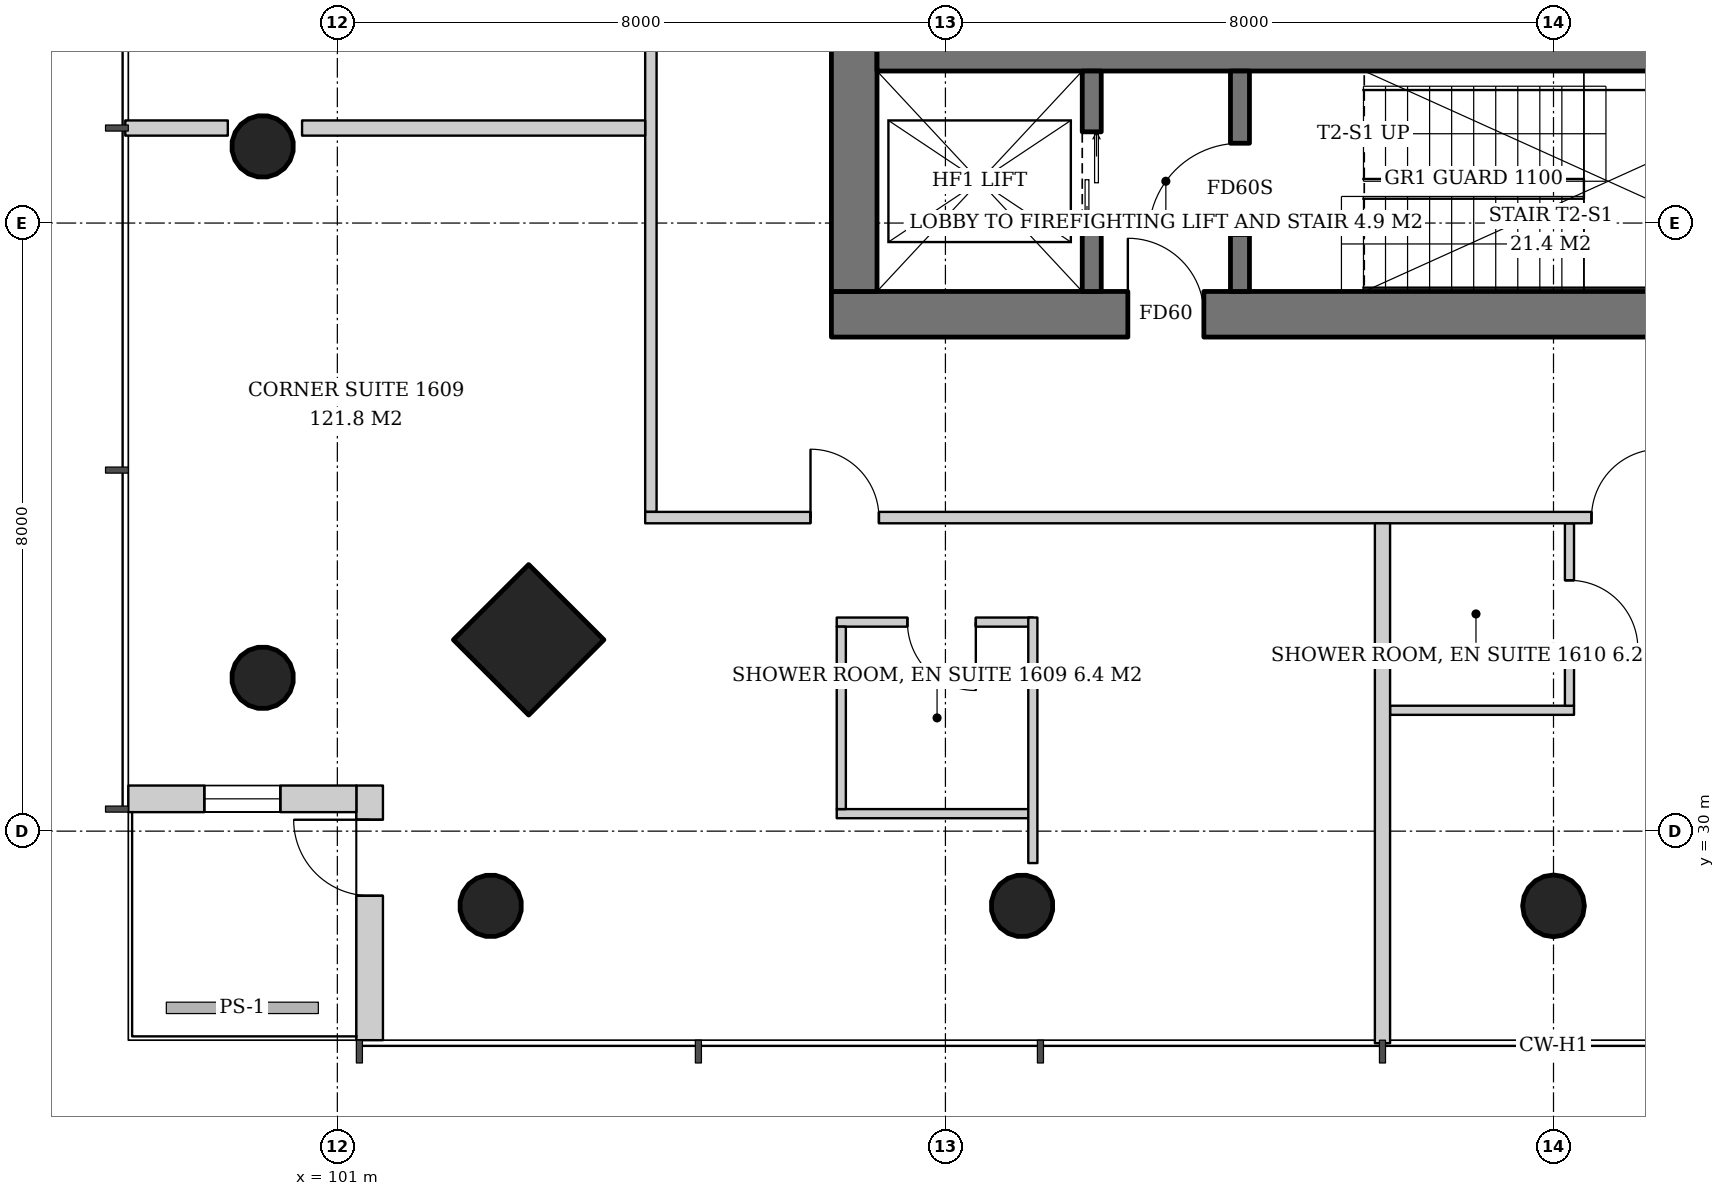
"""IFC4 building model, lengths in metres.
Left out: names, types, materials, properties, quantities, classifications, styles, units other than length and angle.
Written with IfcOpenShell. Run it as: python <this file> out.ifc"""

import sys

from ifc_helpers import new_model, si_unit, direction, frame, frame_2d, origin, origin_2d, place, context, subcontext, project, spatial, rectangle, hollow_circle, extrude, element, fill, save


model = new_model("IFC4")
c1 = context("Model", 3, precision=1e-05, world=origin(), true_north=direction((0.0, 1.0)))
c2 = subcontext(c1, "Body", "Model", "MODEL_VIEW")
j1 = project(units=[si_unit("LENGTHUNIT", "METRE"), si_unit("PLANEANGLEUNIT", "RADIAN")], contexts=[c1])
p1 = place(None, origin())
s1 = spatial("IfcSite", under=j1, at=p1, CompositionType="ELEMENT")
p2 = place(p1, origin())
s2 = spatial("IfcBuilding", under=s1, at=p2, CompositionType="ELEMENT")
p3 = place(p2, frame((0.0, 0.0, 66.6)))
s3 = spatial("IfcBuildingStorey", under=s2, at=p3, CompositionType="ELEMENT", Elevation=66.6)
p4 = place(p3, frame((103.466, 32.466, 0.0), z_axis=(0.043032401563, 0.043032401563, 0.998146494675), x_axis=(-0.707106781187, 0.707106781187, 0.0)))
e1 = element("IfcColumn", 1, at=p4, inside=s3, PredefinedType="COLUMN", context=c2, shape_type="SweptSolid", body=[
    extrude(rectangle(XDim=1.4, YDim=1.4, at=origin_2d()), origin(), (0.0, 0.0, 1.0), 3.807),
])
p5 = place(p3, frame((99.966, 31.966, 0.0), z_axis=(0.043032401563, 0.043032401563, 0.998146494675), x_axis=(-0.707106781187, 0.707106781187, 0.0)))
e2 = element("IfcColumn", 2, at=p5, inside=s3, PredefinedType="COLUMN", context=c2, shape_type="SweptSolid", body=[
    extrude(hollow_circle(Radius=0.406, WallThickness=0.03, at=origin_2d()), origin(), (0.0, 0.0, 1.0), 3.807),
])
p6 = place(p3, frame((99.966, 38.983, 0.0), z_axis=(0.043062285527, 0.021563230905, 0.998839660125), x_axis=(-0.44774654769, 0.894160516368, 0.0)))
e3 = element("IfcColumn", 3, at=p6, inside=s3, PredefinedType="COLUMN", context=c2, shape_type="SweptSolid", body=[
    extrude(hollow_circle(Radius=0.406, WallThickness=0.03, at=origin_2d()), origin(), (0.0, 0.0, 1.0), 3.804),
])
p7 = place(p3, frame((102.966, 28.966, 0.0), z_axis=(0.043032401563, 0.043032401563, 0.998146494675), x_axis=(-0.707106781187, 0.707106781187, 0.0)))
e4 = element("IfcColumn", 4, at=p7, inside=s3, PredefinedType="COLUMN", context=c2, shape_type="SweptSolid", body=[
    extrude(hollow_circle(Radius=0.406, WallThickness=0.03, at=origin_2d()), origin(), (0.0, 0.0, 1.0), 3.807),
])
p8 = place(p3, frame((109.983, 28.966, 0.0), z_axis=(0.021563230905, 0.043062285527, 0.998839660125), x_axis=(-0.894160516368, 0.44774654769, 0.0)))
e5 = element("IfcColumn", 5, at=p8, inside=s3, PredefinedType="COLUMN", context=c2, shape_type="SweptSolid", body=[
    extrude(hollow_circle(Radius=0.406, WallThickness=0.03, at=origin_2d()), origin(), (0.0, 0.0, 1.0), 3.804),
])
p9 = place(p3, frame((117.0, 28.966, 0.0), z_axis=(0.0, 0.043072300418, 0.999071957837), x_axis=(-1.0, 0.0, 0.0)))
e6 = element("IfcColumn", 6, at=p9, inside=s3, PredefinedType="COLUMN", context=c2, shape_type="SweptSolid", body=[
    extrude(hollow_circle(Radius=0.406, WallThickness=0.03, at=origin_2d()), origin(), (0.0, 0.0, 1.0), 3.803),
])
p10 = place(p3, frame((107.5, 36.8, 0.0), z_axis=(0.0, 0.0, 1.0), x_axis=(1.0, 0.0, 0.0)))
e7 = element("IfcWall", 7, at=p10, inside=s3, PredefinedType="SHEAR", context=c2, shape_type="SweptSolid", body=[
    extrude(rectangle(XDim=19.0, YDim=0.6, at=frame_2d((9.5, 0.0))), origin(), (0.0, 0.0, 1.0), 3.8),
])
p11 = place(p10, frame((3.9, 0.0, 0.0)))
e8 = element("IfcOpeningElement", 8, at=p11, cuts=e7, PredefinedType="OPENING", context=c2, shape_type="SweptSolid", body=[
    extrude(rectangle(XDim=1.0, YDim=2.1, at=frame_2d((0.5, 1.05))), frame((0.0, 0.31, 0.0), z_axis=(0.0, -1.0, 0.0), x_axis=(1.0, 0.0, 0.0)), (0.0, 0.0, 1.0), 0.62),
])
p12 = place(p10, frame((14.472, 0.0, 0.0)))
e9 = element("IfcOpeningElement", 9, at=p12, cuts=e7, PredefinedType="OPENING", context=c2, shape_type="SweptSolid", body=[
    extrude(rectangle(XDim=1.0, YDim=2.1, at=frame_2d((0.5, 1.05))), frame((0.0, 0.31, 0.0), z_axis=(0.0, -1.0, 0.0), x_axis=(1.0, 0.0, 0.0)), (0.0, 0.0, 1.0), 0.62),
])
p13 = place(p10, frame((16.365, 0.0, 0.0)))
e10 = element("IfcOpeningElement", 10, at=p13, cuts=e7, PredefinedType="OPENING", context=c2, shape_type="SweptSolid", body=[
    extrude(rectangle(XDim=1.0, YDim=2.1, at=frame_2d((0.5, 1.05))), frame((0.0, 0.31, 0.0), z_axis=(0.0, -1.0, 0.0), x_axis=(1.0, 0.0, 0.0)), (0.0, 0.0, 1.0), 0.62),
])
p14 = place(p3, frame((107.8, 37.1, 0.0), z_axis=(0.0, 0.0, 1.0), x_axis=(0.0, 1.0, 0.0)))
e11 = element("IfcWall", 11, at=p14, inside=s3, PredefinedType="SHEAR", context=c2, shape_type="SweptSolid", body=[
    extrude(rectangle(XDim=17.8, YDim=0.6, at=frame_2d((8.9, 0.0))), origin(), (0.0, 0.0, 1.0), 3.8),
])
p15 = place(p14, frame((8.0, 0.0, 0.0)))
e12 = element("IfcOpeningElement", 12, at=p15, cuts=e11, PredefinedType="OPENING", context=c2, shape_type="SweptSolid", body=[
    extrude(rectangle(XDim=1.8, YDim=2.4, at=frame_2d((0.9, 1.2))), frame((0.0, 0.31, 0.0), z_axis=(0.0, -1.0, 0.0), x_axis=(1.0, 0.0, 0.0)), (0.0, 0.0, 1.0), 0.62),
])
p16 = place(p3, frame((108.1, 40.2, 0.0), z_axis=(0.0, 0.0, 1.0), x_axis=(1.0, 0.0, 0.0)))
e13 = element("IfcWall", 13, at=p16, inside=s3, PredefinedType="SHEAR", context=c2, shape_type="SweptSolid", body=[
    extrude(rectangle(XDim=17.8, YDim=0.4, at=frame_2d((8.9, 0.0))), origin(), (0.0, 0.0, 1.0), 3.8),
])
p17 = place(p3, frame((101.425, 27.25, 0.0), z_axis=(0.0, 0.0, 1.0), x_axis=(0.0, 1.0, 0.0)))
e14 = element("IfcWall", 14, at=p17, inside=s3, PredefinedType="SOLIDWALL", context=c2, shape_type="SweptSolid", body=[
    extrude(rectangle(XDim=3.35, YDim=0.35, at=frame_2d((1.675, 0.0))), origin(), (0.0, 0.0, 1.0), 3.6),
])
p18 = place(p17, frame((1.9, 0.0, 0.0)))
e15 = element("IfcOpeningElement", 15, at=p18, cuts=e14, PredefinedType="OPENING", context=c2, shape_type="SweptSolid", body=[
    extrude(rectangle(XDim=1.0, YDim=2.4, at=frame_2d((0.5, 1.2))), frame((0.0, 0.185, 0.0), z_axis=(0.0, -1.0, 0.0), x_axis=(1.0, 0.0, 0.0)), (0.0, 0.0, 1.0), 0.37),
])
p19 = place(p3, frame((101.25, 30.425, 0.0), z_axis=(0.0, 0.0, 1.0), x_axis=(-1.0, 0.0, 0.0)))
e16 = element("IfcWall", 16, at=p19, inside=s3, PredefinedType="SOLIDWALL", context=c2, shape_type="SweptSolid", body=[
    extrude(rectangle(XDim=3.0, YDim=0.35, at=frame_2d((1.5, 0.0))), origin(), (0.0, 0.0, 1.0), 3.6),
])
p20 = place(p19, frame((1.0, 0.0, 0.9)))
e17 = element("IfcOpeningElement", 17, at=p20, cuts=e16, PredefinedType="OPENING", context=c2, shape_type="SweptSolid", body=[
    extrude(rectangle(XDim=1.0, YDim=2.4, at=frame_2d((0.5, 1.2))), frame((0.0, 0.185, 0.0), z_axis=(0.0, -1.0, 0.0), x_axis=(1.0, 0.0, 0.0)), (0.0, 0.0, 1.0), 0.37),
])
p21 = place(p3, frame((110.925, 37.1, 0.0), z_axis=(0.0, 0.0, 1.0), x_axis=(0.0, 1.0, 0.0)))
e18 = element("IfcWall", 18, at=p21, inside=s3, PredefinedType="SHEAR", context=c2, shape_type="SweptSolid", body=[
    extrude(rectangle(XDim=2.9, YDim=0.25, at=frame_2d((1.45, 0.0))), origin(), (0.0, 0.0, 1.0), 3.8),
])
p22 = place(p21, frame((0.8, 0.0, 0.0)))
e19 = element("IfcOpeningElement", 19, at=p22, cuts=e18, PredefinedType="OPENING", context=c2, shape_type="SweptSolid", body=[
    extrude(rectangle(XDim=1.3, YDim=2.2, at=frame_2d((0.65, 1.1))), frame((0.0, 0.135, 0.0), z_axis=(0.0, -1.0, 0.0), x_axis=(1.0, 0.0, 0.0)), (0.0, 0.0, 1.0), 0.27),
])
p23 = place(p3, frame((112.875, 37.1, 0.0), z_axis=(0.0, 0.0, 1.0), x_axis=(0.0, 1.0, 0.0)))
e20 = element("IfcWall", 20, at=p23, inside=s3, PredefinedType="SHEAR", context=c2, shape_type="SweptSolid", body=[
    extrude(rectangle(XDim=2.9, YDim=0.25, at=frame_2d((1.45, 0.0))), origin(), (0.0, 0.0, 1.0), 3.8),
])
p24 = place(p23, frame((0.75, 0.0, 0.0)))
e21 = element("IfcOpeningElement", 21, at=p24, cuts=e20, PredefinedType="OPENING", context=c2, shape_type="SweptSolid", body=[
    extrude(rectangle(XDim=1.2, YDim=2.1, at=frame_2d((0.6, 1.05))), frame((0.0, 0.135, 0.0), z_axis=(0.0, -1.0, 0.0), x_axis=(1.0, 0.0, 0.0)), (0.0, 0.0, 1.0), 0.27),
])
p25 = place(p3, frame((105.125, 57.95, 0.0), z_axis=(0.0, 0.0, 1.0), x_axis=(0.0, -1.0, 0.0)))
e22 = element("IfcWall", 22, at=p25, inside=s3, PredefinedType="PARTITIONING", context=c2, shape_type="SweptSolid", body=[
    extrude(rectangle(XDim=23.75, YDim=0.15, at=frame_2d((11.875, 0.0))), origin(), (0.0, 0.0, 1.0), 2.8),
])
p26 = place(p25, frame((2.175, 0.0, 0.0)))
e23 = element("IfcOpeningElement", 23, at=p26, cuts=e22, PredefinedType="OPENING", context=c2, shape_type="SweptSolid", body=[
    extrude(rectangle(XDim=0.9, YDim=2.1, at=frame_2d((0.45, 1.05))), frame((0.0, 0.085, 0.0), z_axis=(0.0, -1.0, 0.0), x_axis=(1.0, 0.0, 0.0)), (0.0, 0.0, 1.0), 0.17),
])
p27 = place(p25, frame((7.9, 0.0, 0.0)))
e24 = element("IfcOpeningElement", 24, at=p27, cuts=e22, PredefinedType="OPENING", context=c2, shape_type="SweptSolid", body=[
    extrude(rectangle(XDim=1.0, YDim=2.1, at=frame_2d((0.5, 1.05))), frame((0.0, 0.085, 0.0), z_axis=(0.0, -1.0, 0.0), x_axis=(1.0, 0.0, 0.0)), (0.0, 0.0, 1.0), 0.17),
])
p28 = place(p25, frame((12.45, 0.0, 0.0)))
e25 = element("IfcOpeningElement", 25, at=p28, cuts=e22, PredefinedType="OPENING", context=c2, shape_type="SweptSolid", body=[
    extrude(rectangle(XDim=0.9, YDim=2.1, at=frame_2d((0.45, 1.05))), frame((0.0, 0.085, 0.0), z_axis=(0.0, -1.0, 0.0), x_axis=(1.0, 0.0, 0.0)), (0.0, 0.0, 1.0), 0.17),
])
p29 = place(p3, frame((105.05, 39.25, 0.0), z_axis=(0.0, 0.0, 1.0), x_axis=(-1.0, 0.0, 0.0)))
e26 = element("IfcWall", 26, at=p29, inside=s3, PredefinedType="PARTITIONING", context=c2, shape_type="SweptSolid", body=[
    extrude(rectangle(XDim=4.514, YDim=0.2, at=frame_2d((2.257, 0.0))), origin(), (0.0, 0.0, 1.0), 3.6),
])
p30 = place(p3, frame((99.559, 39.25, 0.0), z_axis=(0.0, 0.0, 1.0), x_axis=(-1.0, 0.0, 0.0)))
e27 = element("IfcWall", 27, at=p30, inside=s3, PredefinedType="PARTITIONING", context=c2, shape_type="SweptSolid", body=[
    extrude(rectangle(XDim=1.349, YDim=0.2, at=frame_2d((0.675, 0.0))), origin(), (0.0, 0.0, 1.0), 3.6),
])
p31 = place(p3, frame((110.15, 32.75, 0.0), z_axis=(0.0, 0.0, 1.0), x_axis=(-1.0, 0.0, 0.0)))
e28 = element("IfcWall", 28, at=p31, inside=s3, PredefinedType="PARTITIONING", context=c2, shape_type="SweptSolid", body=[
    extrude(rectangle(XDim=2.58, YDim=0.12, at=frame_2d((1.29, 0.0))), origin(), (0.0, 0.0, 1.0), 2.8),
])
p32 = place(p31, frame((0.75, 0.0, 0.0)))
e29 = element("IfcOpeningElement", 29, at=p32, cuts=e28, PredefinedType="OPENING", context=c2, shape_type="SweptSolid", body=[
    extrude(rectangle(XDim=0.9, YDim=2.1, at=frame_2d((0.45, 1.05))), frame((0.0, 0.07, 0.0), z_axis=(0.0, -1.0, 0.0), x_axis=(1.0, 0.0, 0.0)), (0.0, 0.0, 1.0), 0.14),
])
p33 = place(p3, frame((110.15, 30.23, 0.0), z_axis=(0.0, 0.0, 1.0), x_axis=(-1.0, 0.0, 0.0)))
e30 = element("IfcWall", 30, at=p33, inside=s3, PredefinedType="PARTITIONING", context=c2, shape_type="SweptSolid", body=[
    extrude(rectangle(XDim=2.58, YDim=0.12, at=frame_2d((1.29, 0.0))), origin(), (0.0, 0.0, 1.0), 2.8),
])
p34 = place(p3, frame((107.63, 32.69, 0.0), z_axis=(0.0, 0.0, 1.0), x_axis=(0.0, -1.0, 0.0)))
e31 = element("IfcWall", 31, at=p34, inside=s3, PredefinedType="PARTITIONING", context=c2, shape_type="SweptSolid", body=[
    extrude(rectangle(XDim=2.4, YDim=0.12, at=frame_2d((1.2, 0.0))), origin(), (0.0, 0.0, 1.0), 2.8),
])
p35 = place(p3, frame((110.15, 32.81, 0.0), z_axis=(0.0, 0.0, 1.0), x_axis=(0.0, -1.0, 0.0)))
e32 = element("IfcWall", 32, at=p35, inside=s3, PredefinedType="PARTITIONING", context=c2, shape_type="SweptSolid", body=[
    extrude(rectangle(XDim=3.23, YDim=0.12, at=frame_2d((1.615, 0.0))), origin(), (0.0, 0.0, 1.0), 3.6),
])
p36 = place(p3, frame((114.85, 31.59, 0.0), z_axis=(0.0, 0.0, 1.0), x_axis=(1.0, 0.0, 0.0)))
e33 = element("IfcWall", 33, at=p36, inside=s3, PredefinedType="PARTITIONING", context=c2, shape_type="SweptSolid", body=[
    extrude(rectangle(XDim=2.42, YDim=0.12, at=frame_2d((1.21, 0.0))), origin(), (0.0, 0.0, 1.0), 2.847),
])
p37 = place(p3, frame((117.21, 34.05, 0.0), z_axis=(0.0, 0.0, 1.0), x_axis=(0.0, -1.0, 0.0)))
e34 = element("IfcWall", 34, at=p37, inside=s3, PredefinedType="PARTITIONING", context=c2, shape_type="SweptSolid", body=[
    extrude(rectangle(XDim=2.4, YDim=0.12, at=frame_2d((1.2, 0.0))), origin(), (0.0, 0.0, 1.0), 3.6),
])
p38 = place(p37, frame((0.75, 0.0, 0.0)))
e35 = element("IfcOpeningElement", 35, at=p38, cuts=e34, PredefinedType="OPENING", context=c2, shape_type="SweptSolid", body=[
    extrude(rectangle(XDim=0.9, YDim=2.1, at=frame_2d((0.45, 1.05))), frame((0.0, 0.07, 0.0), z_axis=(0.0, -1.0, 0.0), x_axis=(1.0, 0.0, 0.0)), (0.0, 0.0, 1.0), 0.14),
])
p39 = place(p3, frame((105.05, 34.125, 0.0), z_axis=(0.0, 0.0, 1.0), x_axis=(1.0, 0.0, 0.0)))
e36 = element("IfcWall", 36, at=p39, inside=s3, PredefinedType="PARTITIONING", context=c2, shape_type="SweptSolid", body=[
    extrude(rectangle(XDim=23.75, YDim=0.15, at=frame_2d((11.875, 0.0))), origin(), (0.0, 0.0, 1.0), 2.8),
])
p40 = place(p39, frame((2.175, 0.0, 0.0)))
e37 = element("IfcOpeningElement", 37, at=p40, cuts=e36, PredefinedType="OPENING", context=c2, shape_type="SweptSolid", body=[
    extrude(rectangle(XDim=0.9, YDim=2.1, at=frame_2d((0.45, 1.05))), frame((0.0, 0.085, 0.0), z_axis=(0.0, -1.0, 0.0), x_axis=(1.0, 0.0, 0.0)), (0.0, 0.0, 1.0), 0.17),
])
p41 = place(p39, frame((12.45, 0.0, 0.0)))
e38 = element("IfcOpeningElement", 38, at=p41, cuts=e36, PredefinedType="OPENING", context=c2, shape_type="SweptSolid", body=[
    extrude(rectangle(XDim=0.9, YDim=2.1, at=frame_2d((0.45, 1.05))), frame((0.0, 0.085, 0.0), z_axis=(0.0, -1.0, 0.0), x_axis=(1.0, 0.0, 0.0)), (0.0, 0.0, 1.0), 0.17),
])
p42 = place(p3, frame((114.75, 34.05, 0.0), z_axis=(0.0, 0.0, 1.0), x_axis=(0.0, -1.0, 0.0)))
e39 = element("IfcWall", 39, at=p42, inside=s3, PredefinedType="PARTITIONING", context=c2, shape_type="SweptSolid", body=[
    extrude(rectangle(XDim=6.84, YDim=0.2, at=frame_2d((3.42, 0.0))), origin(), (0.0, 0.0, 1.0), 3.05),
])
p43 = place(p18, origin())
e40 = element("IfcDoor", 40, at=p43, inside=s3, OperationType="SINGLE_SWING_RIGHT", PredefinedType="DOOR", context=c2, shape_type="SweptSolid", body=[
    extrude(rectangle(XDim=1.0, YDim=2.4, at=frame_2d((0.5, 1.2))), frame((0.0, 0.025, 0.0), z_axis=(0.0, -1.0, 0.0), x_axis=(1.0, 0.0, 0.0)), (0.0, 0.0, 1.0), 0.05),
])
fill(e15, e40)
p44 = place(p20, origin())
e41 = element("IfcWindow", 41, at=p44, inside=s3, PartitioningType="SINGLE_PANEL", PredefinedType="WINDOW", context=c2, shape_type="SweptSolid", body=[
    extrude(rectangle(XDim=1.0, YDim=2.4, at=frame_2d((0.5, 1.2))), frame((0.0, 0.03, 0.0), z_axis=(0.0, -1.0, 0.0), x_axis=(1.0, 0.0, 0.0)), (0.0, 0.0, 1.0), 0.06),
])
fill(e17, e41)
p45 = place(p22, origin())
e42 = element("IfcDoor", 42, at=p45, inside=s3, OperationType="DOUBLE_DOOR_SLIDING", PredefinedType="DOOR", context=c2, shape_type="SweptSolid", body=[
    extrude(rectangle(XDim=1.3, YDim=2.2, at=frame_2d((0.65, 1.1))), frame((0.0, 0.025, 0.0), z_axis=(0.0, -1.0, 0.0), x_axis=(1.0, 0.0, 0.0)), (0.0, 0.0, 1.0), 0.05),
])
fill(e19, e42)
p46 = place(p24, origin())
e43 = element("IfcDoor", 43, at=p46, inside=s3, OperationType="SINGLE_SWING_LEFT", PredefinedType="DOOR", context=c2, shape_type="SweptSolid", body=[
    extrude(rectangle(XDim=1.2, YDim=2.1, at=frame_2d((0.6, 1.05))), frame((0.0, 0.025, 0.0), z_axis=(0.0, -1.0, 0.0), x_axis=(1.0, 0.0, 0.0)), (0.0, 0.0, 1.0), 0.05),
])
fill(e21, e43)
p47 = place(p11, origin())
e44 = element("IfcDoor", 44, at=p47, inside=s3, OperationType="SINGLE_SWING_LEFT", PredefinedType="DOOR", context=c2, shape_type="SweptSolid", body=[
    extrude(rectangle(XDim=1.0, YDim=2.1, at=frame_2d((0.5, 1.05))), frame((0.0, 0.025, 0.0), z_axis=(0.0, -1.0, 0.0), x_axis=(1.0, 0.0, 0.0)), (0.0, 0.0, 1.0), 0.05),
])
fill(e8, e44)
p48 = place(p32, origin())
e45 = element("IfcDoor", 45, at=p48, inside=s3, OperationType="SINGLE_SWING_LEFT", PredefinedType="DOOR", context=c2, shape_type="SweptSolid", body=[
    extrude(rectangle(XDim=0.9, YDim=2.1, at=frame_2d((0.45, 1.05))), frame((0.0, 0.025, 0.0), z_axis=(0.0, -1.0, 0.0), x_axis=(1.0, 0.0, 0.0)), (0.0, 0.0, 1.0), 0.05),
])
fill(e29, e45)
p49 = place(p38, origin())
e46 = element("IfcDoor", 46, at=p49, inside=s3, OperationType="SINGLE_SWING_RIGHT", PredefinedType="DOOR", context=c2, shape_type="SweptSolid", body=[
    extrude(rectangle(XDim=0.9, YDim=2.1, at=frame_2d((0.45, 1.05))), frame((0.0, 0.025, 0.0), z_axis=(0.0, -1.0, 0.0), x_axis=(1.0, 0.0, 0.0)), (0.0, 0.0, 1.0), 0.05),
])
fill(e35, e46)
p50 = place(p40, origin())
e47 = element("IfcDoor", 47, at=p50, inside=s3, OperationType="SINGLE_SWING_LEFT", PredefinedType="DOOR", context=c2, shape_type="SweptSolid", body=[
    extrude(rectangle(XDim=0.9, YDim=2.1, at=frame_2d((0.45, 1.05))), frame((0.0, 0.025, 0.0), z_axis=(0.0, -1.0, 0.0), x_axis=(1.0, 0.0, 0.0)), (0.0, 0.0, 1.0), 0.05),
])
fill(e37, e47)
p51 = place(p41, origin())
e48 = element("IfcDoor", 48, at=p51, inside=s3, OperationType="SINGLE_SWING_RIGHT", PredefinedType="DOOR", context=c2, shape_type="SweptSolid", body=[
    extrude(rectangle(XDim=0.9, YDim=2.1, at=frame_2d((0.45, 1.05))), frame((0.0, 0.025, 0.0), z_axis=(0.0, -1.0, 0.0), x_axis=(1.0, 0.0, 0.0)), (0.0, 0.0, 1.0), 0.05),
])
fill(e38, e48)
save(model, sys.argv[1])
